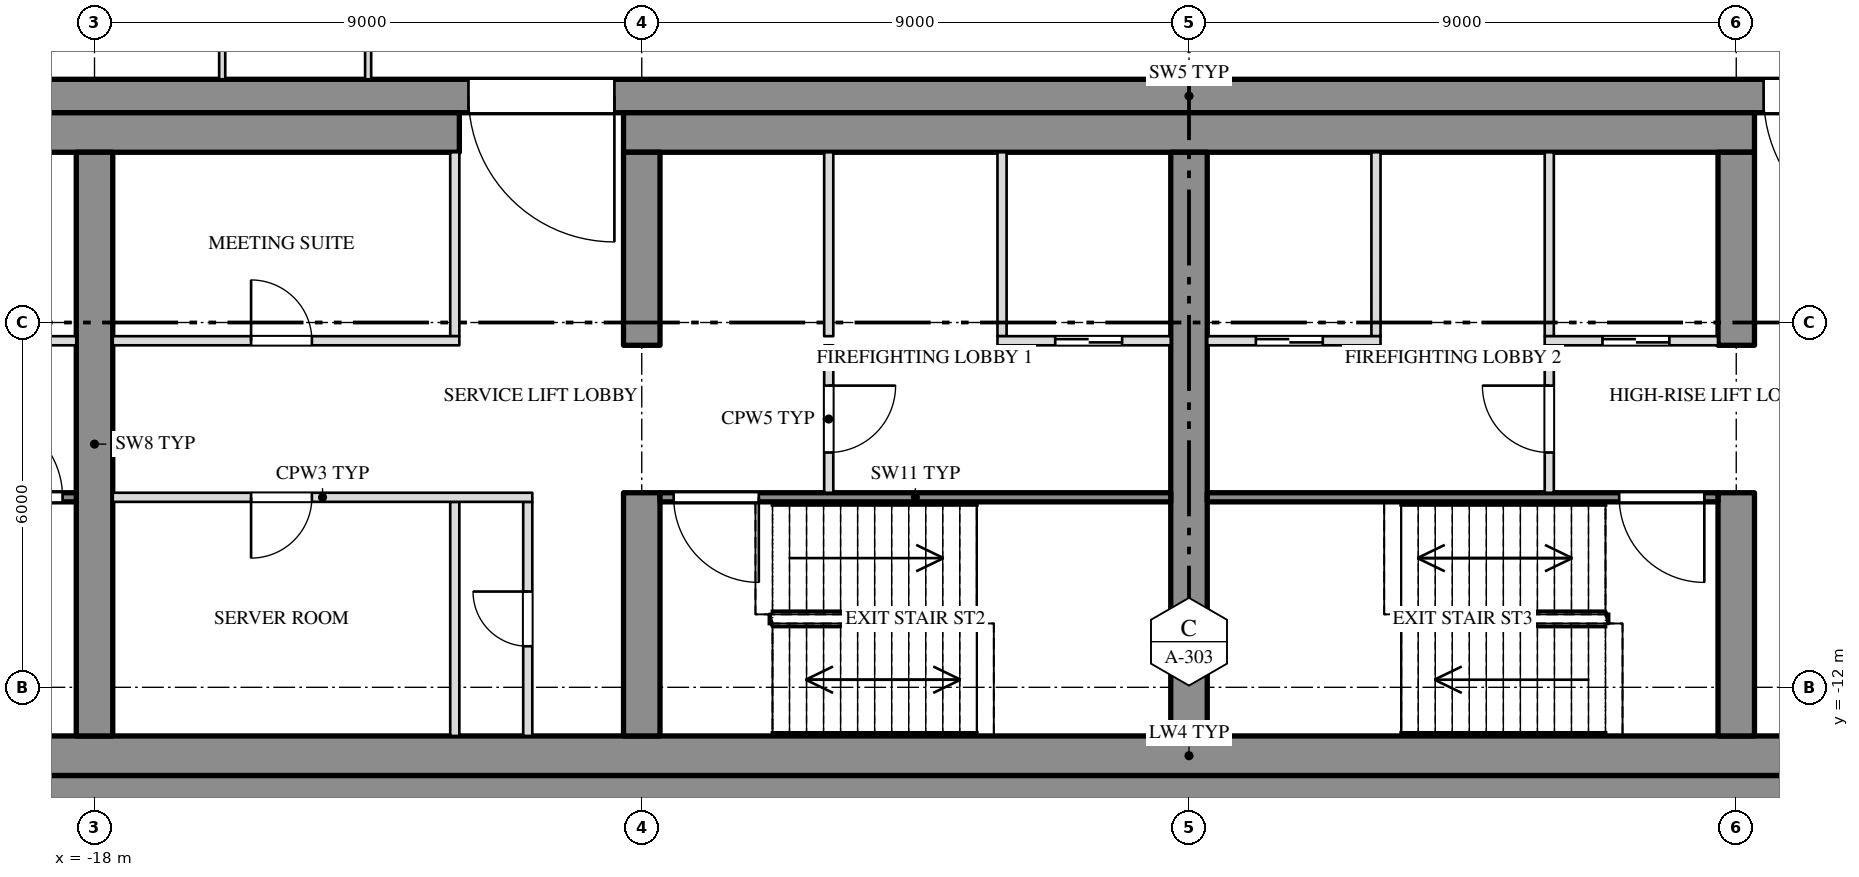
"""IFC4 building model, lengths in metres.
Left out: names, types, materials, properties, quantities, classifications, styles, units other than length and angle.
Written with IfcOpenShell. Run it as: python <this file> out.ifc"""

import sys

from ifc_helpers import new_model, si_unit, direction, frame, frame_2d, origin, place, context, subcontext, project, spatial, rectangle, extrude, element, fill, save


model = new_model("IFC4")
c1 = context("Model", 3, precision=1e-05, world=origin(), true_north=direction((0.0, 1.0)))
c2 = subcontext(c1, "Body", "Model", "MODEL_VIEW")
j1 = project(units=[si_unit("LENGTHUNIT", "METRE"), si_unit("PLANEANGLEUNIT", "RADIAN")], contexts=[c1])
p1 = place(None, origin())
s1 = spatial("IfcSite", under=j1, at=p1, CompositionType="ELEMENT")
p2 = place(p1, origin())
s2 = spatial("IfcBuilding", under=s1, at=p2, CompositionType="ELEMENT")
p3 = place(p2, frame((0.0, 0.0, 292.5)))
s3 = spatial("IfcBuildingStorey", under=s2, at=p3, CompositionType="ELEMENT", Elevation=292.5)
p4 = place(p3, frame((-27.0, -2.275, 0.0), z_axis=(0.0, 0.0, 1.0), x_axis=(1.0, 0.0, 0.0)))
e1 = element("IfcWall", 1, at=p4, inside=s3, PredefinedType="SHEAR", context=c2, shape_type="SweptSolid", body=[
    extrude(rectangle(XDim=54.0, YDim=0.55, at=frame_2d((27.0, 0.0))), origin(), (0.0, 0.0, 1.0), 3.6),
])
p5 = place(p4, frame((15.15, 0.0, 0.0)))
e2 = element("IfcOpeningElement", 2, at=p5, cuts=e1, PredefinedType="OPENING", context=c2, shape_type="SweptSolid", body=[
    extrude(rectangle(XDim=2.4, YDim=2.1, at=frame_2d((1.2, 1.05))), frame((0.0, 0.287, 0.0), z_axis=(0.0, -1.0, 0.0), x_axis=(1.0, 0.0, 0.0)), (0.0, 0.0, 1.0), 0.574),
])
p6 = place(p4, frame((36.45, 0.0, 0.0)))
e3 = element("IfcOpeningElement", 3, at=p6, cuts=e1, PredefinedType="OPENING", context=c2, shape_type="SweptSolid", body=[
    extrude(rectangle(XDim=2.4, YDim=2.1, at=frame_2d((1.2, 1.05))), frame((0.0, 0.287, 0.0), z_axis=(0.0, -1.0, 0.0), x_axis=(1.0, 0.0, 0.0)), (0.0, 0.0, 1.0), 0.574),
])
p7 = place(p3, frame((-27.0, -13.725, 0.0), z_axis=(0.0, 0.0, 1.0), x_axis=(1.0, 0.0, 0.0)))
e4 = element("IfcWall", 4, at=p7, inside=s3, PredefinedType="SHEAR", context=c2, shape_type="SweptSolid", body=[
    extrude(rectangle(XDim=54.0, YDim=0.55, at=frame_2d((27.0, 0.0))), origin(), (0.0, 0.0, 1.0), 3.6),
])
p8 = place(p3, frame((-26.45, -2.875, 0.0), z_axis=(0.0, 0.0, 1.0), x_axis=(1.0, 0.0, 0.0)))
e5 = element("IfcWall", 5, at=p8, inside=s3, PredefinedType="SHEAR", context=c2, shape_type="SweptSolid", body=[
    extrude(rectangle(XDim=14.45, YDim=0.65, at=frame_2d((7.225, 0.0))), origin(), (0.0, 0.0, 1.0), 3.6),
])
p9 = place(p3, frame((-9.3, -2.875, 0.0), z_axis=(0.0, 0.0, 1.0), x_axis=(1.0, 0.0, 0.0)))
e6 = element("IfcWall", 6, at=p9, inside=s3, PredefinedType="SHEAR", context=c2, shape_type="SweptSolid", body=[
    extrude(rectangle(XDim=18.6, YDim=0.65, at=frame_2d((9.3, 0.0))), origin(), (0.0, 0.0, 1.0), 3.6),
])
p10 = place(p3, frame((-26.45, -13.125, 0.0), z_axis=(0.0, 0.0, 1.0), x_axis=(1.0, 0.0, 0.0)))
e7 = element("IfcWall", 7, at=p10, inside=s3, PredefinedType="SHEAR", context=c2, shape_type="SweptSolid", body=[
    extrude(rectangle(XDim=52.9, YDim=0.65, at=frame_2d((26.45, 0.0))), origin(), (0.0, 0.0, 1.0), 3.6),
])
p11 = place(p3, frame((-18.0, -12.8, 0.0), z_axis=(0.0, 0.0, 1.0), x_axis=(0.0, 1.0, 0.0)))
e8 = element("IfcWall", 8, at=p11, inside=s3, PredefinedType="SHEAR", context=c2, shape_type="SweptSolid", body=[
    extrude(rectangle(XDim=9.6, YDim=0.6, at=frame_2d((4.8, 0.0))), origin(), (0.0, 0.0, 1.0), 3.6),
])
p12 = place(p3, frame((-9.0, -12.8, 0.0), z_axis=(0.0, 0.0, 1.0), x_axis=(0.0, 1.0, 0.0)))
e9 = element("IfcWall", 9, at=p12, inside=s3, PredefinedType="SHEAR", context=c2, shape_type="SweptSolid", body=[
    extrude(rectangle(XDim=4.0, YDim=0.6, at=frame_2d((2.0, 0.0))), origin(), (0.0, 0.0, 1.0), 3.6),
])
p13 = place(p3, frame((-9.0, -6.375, 0.0), z_axis=(0.0, 0.0, 1.0), x_axis=(0.0, 1.0, 0.0)))
e10 = element("IfcWall", 10, at=p13, inside=s3, PredefinedType="SHEAR", context=c2, shape_type="SweptSolid", body=[
    extrude(rectangle(XDim=3.175, YDim=0.6, at=frame_2d((1.587, 0.0))), origin(), (0.0, 0.0, 1.0), 3.6),
])
p14 = place(p3, frame((0.0, -12.8, 0.0), z_axis=(0.0, 0.0, 1.0), x_axis=(0.0, 1.0, 0.0)))
e11 = element("IfcWall", 11, at=p14, inside=s3, PredefinedType="SHEAR", context=c2, shape_type="SweptSolid", body=[
    extrude(rectangle(XDim=9.6, YDim=0.6, at=frame_2d((4.8, 0.0))), origin(), (0.0, 0.0, 1.0), 3.6),
])
p15 = place(p3, frame((9.0, -12.8, 0.0), z_axis=(0.0, 0.0, 1.0), x_axis=(0.0, 1.0, 0.0)))
e12 = element("IfcWall", 12, at=p15, inside=s3, PredefinedType="SHEAR", context=c2, shape_type="SweptSolid", body=[
    extrude(rectangle(XDim=4.0, YDim=0.6, at=frame_2d((2.0, 0.0))), origin(), (0.0, 0.0, 1.0), 3.6),
])
p16 = place(p3, frame((9.0, -6.375, 0.0), z_axis=(0.0, 0.0, 1.0), x_axis=(0.0, 1.0, 0.0)))
e13 = element("IfcWall", 13, at=p16, inside=s3, PredefinedType="SHEAR", context=c2, shape_type="SweptSolid", body=[
    extrude(rectangle(XDim=3.175, YDim=0.6, at=frame_2d((1.587, 0.0))), origin(), (0.0, 0.0, 1.0), 3.6),
])
p17 = place(p3, frame((-15.9, -2.0, 0.0), z_axis=(0.0, 0.0, 1.0), x_axis=(0.0, 1.0, 0.0)))
e14 = element("IfcWall", 14, at=p17, inside=s3, PredefinedType="PARTITIONING", context=c2, shape_type="SweptSolid", body=[
    extrude(rectangle(XDim=3.55, YDim=0.1, at=frame_2d((1.775, 0.0))), origin(), (0.0, 0.0, 1.0), 3.6),
])
p18 = place(p3, frame((-13.5, -2.0, 0.0), z_axis=(0.0, 0.0, 1.0), x_axis=(0.0, 1.0, 0.0)))
e15 = element("IfcWall", 15, at=p18, inside=s3, PredefinedType="PARTITIONING", context=c2, shape_type="SweptSolid", body=[
    extrude(rectangle(XDim=5.95, YDim=0.1, at=frame_2d((2.975, 0.0))), origin(), (0.0, 0.0, 1.0), 2.988),
])
for number, where, z_axis, x_axis in (
    (16, (-12.075, -6.225, 0.0), (0.0, 0.0, 1.0), (0.0, 1.0, 0.0)),
    (17, (-3.075, -6.225, 0.0), (0.0, 0.0, 1.0), (0.0, 1.0, 0.0)),
    (18, (-5.925, -6.225, 0.0), (0.0, 0.0, 1.0), (0.0, 1.0, 0.0)),
    (19, (3.075, -6.225, 0.0), (0.0, 0.0, 1.0), (0.0, 1.0, 0.0)),
    (20, (5.925, -6.225, 0.0), (0.0, 0.0, 1.0), (0.0, 1.0, 0.0)),
):
    element("IfcWall", number, at=place(p3, frame(where, z_axis=z_axis, x_axis=x_axis)), inside=s3, PredefinedType="PARTITIONING", context=c2, shape_type="SweptSolid", body=[
        extrude(rectangle(XDim=3.025, YDim=0.15, at=frame_2d((1.513, 0.0))), origin(), (0.0, 0.0, 1.0), 3.6),
    ])
p19 = place(p3, frame((-10.875, -12.8, 0.0), z_axis=(0.0, 0.0, 1.0), x_axis=(0.0, 1.0, 0.0)))
e21 = element("IfcWall", 21, at=p19, inside=s3, PredefinedType="PARTITIONING", context=c2, shape_type="SweptSolid", body=[
    extrude(rectangle(XDim=3.85, YDim=0.15, at=frame_2d((1.925, 0.0))), origin(), (0.0, 0.0, 1.0), 3.6),
])
p20 = place(p19, frame((1.475, 0.0, 0.0)))
e22 = element("IfcOpeningElement", 22, at=p20, cuts=e21, PredefinedType="OPENING", context=c2, shape_type="SweptSolid", body=[
    extrude(rectangle(XDim=0.9, YDim=2.1, at=frame_2d((0.45, 1.05))), frame((0.0, 0.087, 0.0), z_axis=(0.0, -1.0, 0.0), x_axis=(1.0, 0.0, 0.0)), (0.0, 0.0, 1.0), 0.174),
])
p21 = place(p3, frame((-12.075, -12.8, 0.0), z_axis=(0.0, 0.0, 1.0), x_axis=(0.0, 1.0, 0.0)))
e23 = element("IfcWall", 23, at=p21, inside=s3, PredefinedType="PARTITIONING", context=c2, shape_type="SweptSolid", body=[
    extrude(rectangle(XDim=3.85, YDim=0.15, at=frame_2d((1.925, 0.0))), origin(), (0.0, 0.0, 1.0), 3.6),
])
p22 = place(p3, frame((-5.925, -8.8, 0.0), z_axis=(0.0, 0.0, 1.0), x_axis=(0.0, 1.0, 0.0)))
e24 = element("IfcWall", 24, at=p22, inside=s3, PredefinedType="PARTITIONING", context=c2, shape_type="SweptSolid", body=[
    extrude(rectangle(XDim=2.425, YDim=0.15, at=frame_2d((1.212, 0.0))), origin(), (0.0, 0.0, 1.0), 3.6),
])
p23 = place(p22, frame((0.662, 0.0, 0.0)))
e25 = element("IfcOpeningElement", 25, at=p23, cuts=e24, PredefinedType="OPENING", context=c2, shape_type="SweptSolid", body=[
    extrude(rectangle(XDim=1.1, YDim=2.1, at=frame_2d((0.55, 1.05))), frame((0.0, 0.087, 0.0), z_axis=(0.0, -1.0, 0.0), x_axis=(1.0, 0.0, 0.0)), (0.0, 0.0, 1.0), 0.174),
])
p24 = place(p3, frame((5.925, -8.8, 0.0), z_axis=(0.0, 0.0, 1.0), x_axis=(0.0, 1.0, 0.0)))
e26 = element("IfcWall", 26, at=p24, inside=s3, PredefinedType="PARTITIONING", context=c2, shape_type="SweptSolid", body=[
    extrude(rectangle(XDim=2.425, YDim=0.15, at=frame_2d((1.212, 0.0))), origin(), (0.0, 0.0, 1.0), 3.6),
])
p25 = place(p24, frame((0.662, 0.0, 0.0)))
e27 = element("IfcOpeningElement", 27, at=p25, cuts=e26, PredefinedType="OPENING", context=c2, shape_type="SweptSolid", body=[
    extrude(rectangle(XDim=1.1, YDim=2.1, at=frame_2d((0.55, 1.05))), frame((0.0, 0.087, 0.0), z_axis=(0.0, -1.0, 0.0), x_axis=(1.0, 0.0, 0.0)), (0.0, 0.0, 1.0), 0.174),
])
p26 = place(p3, frame((-23.4, -6.3, 0.0), z_axis=(0.0, 0.0, 1.0), x_axis=(1.0, 0.0, 0.0)))
e28 = element("IfcWall", 28, at=p26, inside=s3, PredefinedType="PARTITIONING", context=c2, shape_type="SweptSolid", body=[
    extrude(rectangle(XDim=5.1, YDim=0.15, at=frame_2d((2.55, 0.0))), origin(), (0.0, 0.0, 1.0), 3.6),
])
p27 = place(p26, frame((0.65, 0.0, 0.0)))
e29 = element("IfcOpeningElement", 29, at=p27, cuts=e28, PredefinedType="OPENING", context=c2, shape_type="SweptSolid", body=[
    extrude(rectangle(XDim=1.4, YDim=2.1, at=frame_2d((0.7, 1.05))), frame((0.0, 0.087, 0.0), z_axis=(0.0, -1.0, 0.0), x_axis=(1.0, 0.0, 0.0)), (0.0, 0.0, 1.0), 0.174),
])
p28 = place(p26, frame((3.35, 0.0, 0.0)))
e30 = element("IfcOpeningElement", 30, at=p28, cuts=e28, PredefinedType="OPENING", context=c2, shape_type="SweptSolid", body=[
    extrude(rectangle(XDim=1.1, YDim=2.1, at=frame_2d((0.55, 1.05))), frame((0.0, 0.087, 0.0), z_axis=(0.0, -1.0, 0.0), x_axis=(1.0, 0.0, 0.0)), (0.0, 0.0, 1.0), 0.174),
])
p29 = place(p3, frame((-17.7, -6.3, 0.0), z_axis=(0.0, 0.0, 1.0), x_axis=(1.0, 0.0, 0.0)))
e31 = element("IfcWall", 31, at=p29, inside=s3, PredefinedType="PARTITIONING", context=c2, shape_type="SweptSolid", body=[
    extrude(rectangle(XDim=5.7, YDim=0.15, at=frame_2d((2.85, 0.0))), origin(), (0.0, 0.0, 1.0), 3.6),
])
p30 = place(p29, frame((2.275, 0.0, 0.0)))
e32 = element("IfcOpeningElement", 32, at=p30, cuts=e31, PredefinedType="OPENING", context=c2, shape_type="SweptSolid", body=[
    extrude(rectangle(XDim=1.0, YDim=2.1, at=frame_2d((0.5, 1.05))), frame((0.0, 0.087, 0.0), z_axis=(0.0, -1.0, 0.0), x_axis=(1.0, 0.0, 0.0)), (0.0, 0.0, 1.0), 0.174),
])
p31 = place(p3, frame((-3.15, -6.3, 0.0), z_axis=(0.0, 0.0, 1.0), x_axis=(1.0, 0.0, 0.0)))
e33 = element("IfcWall", 33, at=p31, inside=s3, PredefinedType="PARTITIONING", context=c2, shape_type="SweptSolid", body=[
    extrude(rectangle(XDim=2.85, YDim=0.15, at=frame_2d((1.425, 0.0))), origin(), (0.0, 0.0, 1.0), 3.6),
])
p32 = place(p31, frame((0.95, 0.0, 0.0)))
e34 = element("IfcOpeningElement", 34, at=p32, cuts=e33, PredefinedType="OPENING", context=c2, shape_type="SweptSolid", body=[
    extrude(rectangle(XDim=1.1, YDim=2.1, at=frame_2d((0.55, 1.05))), frame((0.0, 0.087, 0.0), z_axis=(0.0, -1.0, 0.0), x_axis=(1.0, 0.0, 0.0)), (0.0, 0.0, 1.0), 0.174),
])
p33 = place(p3, frame((0.3, -6.3, 0.0), z_axis=(0.0, 0.0, 1.0), x_axis=(1.0, 0.0, 0.0)))
e35 = element("IfcWall", 35, at=p33, inside=s3, PredefinedType="PARTITIONING", context=c2, shape_type="SweptSolid", body=[
    extrude(rectangle(XDim=2.85, YDim=0.15, at=frame_2d((1.425, 0.0))), origin(), (0.0, 0.0, 1.0), 3.6),
])
p34 = place(p33, frame((0.8, 0.0, 0.0)))
e36 = element("IfcOpeningElement", 36, at=p34, cuts=e35, PredefinedType="OPENING", context=c2, shape_type="SweptSolid", body=[
    extrude(rectangle(XDim=1.1, YDim=2.1, at=frame_2d((0.55, 1.05))), frame((0.0, 0.087, 0.0), z_axis=(0.0, -1.0, 0.0), x_axis=(1.0, 0.0, 0.0)), (0.0, 0.0, 1.0), 0.174),
])
p35 = place(p3, frame((5.85, -6.3, 0.0), z_axis=(0.0, 0.0, 1.0), x_axis=(1.0, 0.0, 0.0)))
e37 = element("IfcWall", 37, at=p35, inside=s3, PredefinedType="PARTITIONING", context=c2, shape_type="SweptSolid", body=[
    extrude(rectangle(XDim=2.85, YDim=0.15, at=frame_2d((1.425, 0.0))), origin(), (0.0, 0.0, 1.0), 3.6),
])
p36 = place(p35, frame((0.95, 0.0, 0.0)))
e38 = element("IfcOpeningElement", 38, at=p36, cuts=e37, PredefinedType="OPENING", context=c2, shape_type="SweptSolid", body=[
    extrude(rectangle(XDim=1.1, YDim=2.1, at=frame_2d((0.55, 1.05))), frame((0.0, 0.087, 0.0), z_axis=(0.0, -1.0, 0.0), x_axis=(1.0, 0.0, 0.0)), (0.0, 0.0, 1.0), 0.174),
])
p37 = place(p3, frame((-25.8, -8.875, 0.0), z_axis=(0.0, 0.0, 1.0), x_axis=(1.0, 0.0, 0.0)))
e39 = element("IfcWall", 39, at=p37, inside=s3, PredefinedType="SHEAR", context=c2, shape_type="SweptSolid", body=[
    extrude(rectangle(XDim=7.5, YDim=0.15, at=frame_2d((3.75, 0.0))), origin(), (0.0, 0.0, 1.0), 3.6),
])
p38 = place(p37, frame((5.875, 0.0, 0.0)))
e40 = element("IfcOpeningElement", 40, at=p38, cuts=e39, PredefinedType="OPENING", context=c2, shape_type="SweptSolid", body=[
    extrude(rectangle(XDim=1.4, YDim=2.1, at=frame_2d((0.7, 1.05))), frame((0.0, 0.087, 0.0), z_axis=(0.0, -1.0, 0.0), x_axis=(1.0, 0.0, 0.0)), (0.0, 0.0, 1.0), 0.174),
])
p39 = place(p3, frame((-17.7, -8.875, 0.0), z_axis=(0.0, 0.0, 1.0), x_axis=(1.0, 0.0, 0.0)))
e41 = element("IfcWall", 41, at=p39, inside=s3, PredefinedType="PARTITIONING", context=c2, shape_type="SweptSolid", body=[
    extrude(rectangle(XDim=6.9, YDim=0.15, at=frame_2d((3.45, 0.0))), origin(), (0.0, 0.0, 1.0), 3.6),
])
p40 = place(p39, frame((2.275, 0.0, 0.0)))
e42 = element("IfcOpeningElement", 42, at=p40, cuts=e41, PredefinedType="OPENING", context=c2, shape_type="SweptSolid", body=[
    extrude(rectangle(XDim=1.0, YDim=2.1, at=frame_2d((0.5, 1.05))), frame((0.0, 0.087, 0.0), z_axis=(0.0, -1.0, 0.0), x_axis=(1.0, 0.0, 0.0)), (0.0, 0.0, 1.0), 0.174),
])
p41 = place(p3, frame((-8.7, -8.875, 0.0), z_axis=(0.0, 0.0, 1.0), x_axis=(1.0, 0.0, 0.0)))
e43 = element("IfcWall", 43, at=p41, inside=s3, PredefinedType="SHEAR", context=c2, shape_type="SweptSolid", body=[
    extrude(rectangle(XDim=8.4, YDim=0.15, at=frame_2d((4.2, 0.0))), origin(), (0.0, 0.0, 1.0), 3.6),
])
p42 = place(p41, frame((0.225, 0.0, 0.0)))
e44 = element("IfcOpeningElement", 44, at=p42, cuts=e43, PredefinedType="OPENING", context=c2, shape_type="SweptSolid", body=[
    extrude(rectangle(XDim=1.4, YDim=2.1, at=frame_2d((0.7, 1.05))), frame((0.0, 0.087, 0.0), z_axis=(0.0, -1.0, 0.0), x_axis=(1.0, 0.0, 0.0)), (0.0, 0.0, 1.0), 0.174),
])
p43 = place(p3, frame((0.3, -8.875, 0.0), z_axis=(0.0, 0.0, 1.0), x_axis=(1.0, 0.0, 0.0)))
e45 = element("IfcWall", 45, at=p43, inside=s3, PredefinedType="SHEAR", context=c2, shape_type="SweptSolid", body=[
    extrude(rectangle(XDim=8.4, YDim=0.15, at=frame_2d((4.2, 0.0))), origin(), (0.0, 0.0, 1.0), 3.6),
])
p44 = place(p43, frame((6.775, 0.0, 0.0)))
e46 = element("IfcOpeningElement", 46, at=p44, cuts=e45, PredefinedType="OPENING", context=c2, shape_type="SweptSolid", body=[
    extrude(rectangle(XDim=1.4, YDim=2.1, at=frame_2d((0.7, 1.05))), frame((0.0, 0.087, 0.0), z_axis=(0.0, -1.0, 0.0), x_axis=(1.0, 0.0, 0.0)), (0.0, 0.0, 1.0), 0.174),
])
p45 = place(p38, origin())
e47 = element("IfcDoor", 47, at=p45, inside=s3, OperationType="DOUBLE_DOOR_SINGLE_SWING", PredefinedType="DOOR", context=c2, shape_type="SweptSolid", body=[
    extrude(rectangle(XDim=1.4, YDim=2.1, at=frame_2d((0.7, 1.05))), frame((0.0, 0.025, 0.0), z_axis=(0.0, -1.0, 0.0), x_axis=(1.0, 0.0, 0.0)), (0.0, 0.0, 1.0), 0.05),
])
fill(e40, e47)
p46 = place(p40, origin())
e48 = element("IfcDoor", 48, at=p46, inside=s3, OperationType="SINGLE_SWING_RIGHT", PredefinedType="DOOR", context=c2, shape_type="SweptSolid", body=[
    extrude(rectangle(XDim=1.0, YDim=2.1, at=frame_2d((0.5, 1.05))), frame((0.0, 0.025, 0.0), z_axis=(0.0, -1.0, 0.0), x_axis=(1.0, 0.0, 0.0)), (0.0, 0.0, 1.0), 0.05),
])
fill(e42, e48)
p47 = place(p30, origin())
e49 = element("IfcDoor", 49, at=p47, inside=s3, OperationType="SINGLE_SWING_LEFT", PredefinedType="DOOR", context=c2, shape_type="SweptSolid", body=[
    extrude(rectangle(XDim=1.0, YDim=2.1, at=frame_2d((0.5, 1.05))), frame((0.0, 0.025, 0.0), z_axis=(0.0, -1.0, 0.0), x_axis=(1.0, 0.0, 0.0)), (0.0, 0.0, 1.0), 0.05),
])
fill(e32, e49)
p48 = place(p20, origin())
e50 = element("IfcDoor", 50, at=p48, inside=s3, OperationType="SINGLE_SWING_RIGHT", PredefinedType="DOOR", context=c2, shape_type="SweptSolid", body=[
    extrude(rectangle(XDim=0.9, YDim=2.1, at=frame_2d((0.45, 1.05))), frame((0.0, 0.025, 0.0), z_axis=(0.0, -1.0, 0.0), x_axis=(1.0, 0.0, 0.0)), (0.0, 0.0, 1.0), 0.05),
])
fill(e22, e50)
p49 = place(p5, origin())
e51 = element("IfcDoor", 51, at=p49, inside=s3, OperationType="DOUBLE_DOOR_SINGLE_SWING", PredefinedType="DOOR", context=c2, shape_type="SweptSolid", body=[
    extrude(rectangle(XDim=2.4, YDim=2.1, at=frame_2d((1.2, 1.05))), frame((0.0, 0.025, 0.0), z_axis=(0.0, -1.0, 0.0), x_axis=(1.0, 0.0, 0.0)), (0.0, 0.0, 1.0), 0.05),
])
fill(e2, e51)
p50 = place(p42, origin())
e52 = element("IfcDoor", 52, at=p50, inside=s3, OperationType="DOUBLE_DOOR_SINGLE_SWING", PredefinedType="DOOR", context=c2, shape_type="SweptSolid", body=[
    extrude(rectangle(XDim=1.4, YDim=2.1, at=frame_2d((0.7, 1.05))), frame((0.0, 0.025, 0.0), z_axis=(0.0, -1.0, 0.0), x_axis=(1.0, 0.0, 0.0)), (0.0, 0.0, 1.0), 0.05),
])
fill(e44, e52)
p51 = place(p23, origin())
e53 = element("IfcDoor", 53, at=p51, inside=s3, OperationType="SINGLE_SWING_LEFT", PredefinedType="DOOR", context=c2, shape_type="SweptSolid", body=[
    extrude(rectangle(XDim=1.1, YDim=2.1, at=frame_2d((0.55, 1.05))), frame((0.0, 0.025, 0.0), z_axis=(0.0, -1.0, 0.0), x_axis=(1.0, 0.0, 0.0)), (0.0, 0.0, 1.0), 0.05),
])
fill(e25, e53)
p52 = place(p32, origin())
e54 = element("IfcDoor", 54, at=p52, inside=s3, OperationType="SLIDING_TO_LEFT", PredefinedType="DOOR", context=c2, shape_type="SweptSolid", body=[
    extrude(rectangle(XDim=1.1, YDim=2.1, at=frame_2d((0.55, 1.05))), frame((0.0, 0.025, 0.0), z_axis=(0.0, -1.0, 0.0), x_axis=(1.0, 0.0, 0.0)), (0.0, 0.0, 1.0), 0.05),
])
fill(e34, e54)
p53 = place(p34, origin())
e55 = element("IfcDoor", 55, at=p53, inside=s3, OperationType="SLIDING_TO_RIGHT", PredefinedType="DOOR", context=c2, shape_type="SweptSolid", body=[
    extrude(rectangle(XDim=1.1, YDim=2.1, at=frame_2d((0.55, 1.05))), frame((0.0, 0.025, 0.0), z_axis=(0.0, -1.0, 0.0), x_axis=(1.0, 0.0, 0.0)), (0.0, 0.0, 1.0), 0.05),
])
fill(e36, e55)
p54 = place(p25, origin())
e56 = element("IfcDoor", 56, at=p54, inside=s3, OperationType="SINGLE_SWING_RIGHT", PredefinedType="DOOR", context=c2, shape_type="SweptSolid", body=[
    extrude(rectangle(XDim=1.1, YDim=2.1, at=frame_2d((0.55, 1.05))), frame((0.0, 0.025, 0.0), z_axis=(0.0, -1.0, 0.0), x_axis=(1.0, 0.0, 0.0)), (0.0, 0.0, 1.0), 0.05),
])
fill(e27, e56)
p55 = place(p36, origin())
e57 = element("IfcDoor", 57, at=p55, inside=s3, OperationType="SLIDING_TO_RIGHT", PredefinedType="DOOR", context=c2, shape_type="SweptSolid", body=[
    extrude(rectangle(XDim=1.1, YDim=2.1, at=frame_2d((0.55, 1.05))), frame((0.0, 0.025, 0.0), z_axis=(0.0, -1.0, 0.0), x_axis=(1.0, 0.0, 0.0)), (0.0, 0.0, 1.0), 0.05),
])
fill(e38, e57)
p56 = place(p44, origin())
e58 = element("IfcDoor", 58, at=p56, inside=s3, OperationType="DOUBLE_DOOR_SINGLE_SWING", PredefinedType="DOOR", context=c2, shape_type="SweptSolid", body=[
    extrude(rectangle(XDim=1.4, YDim=2.1, at=frame_2d((0.7, 1.05))), frame((0.0, 0.025, 0.0), z_axis=(0.0, -1.0, 0.0), x_axis=(1.0, 0.0, 0.0)), (0.0, 0.0, 1.0), 0.05),
])
fill(e46, e58)
p57 = place(p6, origin())
e59 = element("IfcDoor", 59, at=p57, inside=s3, OperationType="DOUBLE_DOOR_SINGLE_SWING", PredefinedType="DOOR", context=c2, shape_type="SweptSolid", body=[
    extrude(rectangle(XDim=2.4, YDim=2.1, at=frame_2d((1.2, 1.05))), frame((0.0, 0.025, 0.0), z_axis=(0.0, -1.0, 0.0), x_axis=(1.0, 0.0, 0.0)), (0.0, 0.0, 1.0), 0.05),
])
fill(e3, e59)
save(model, sys.argv[1])
